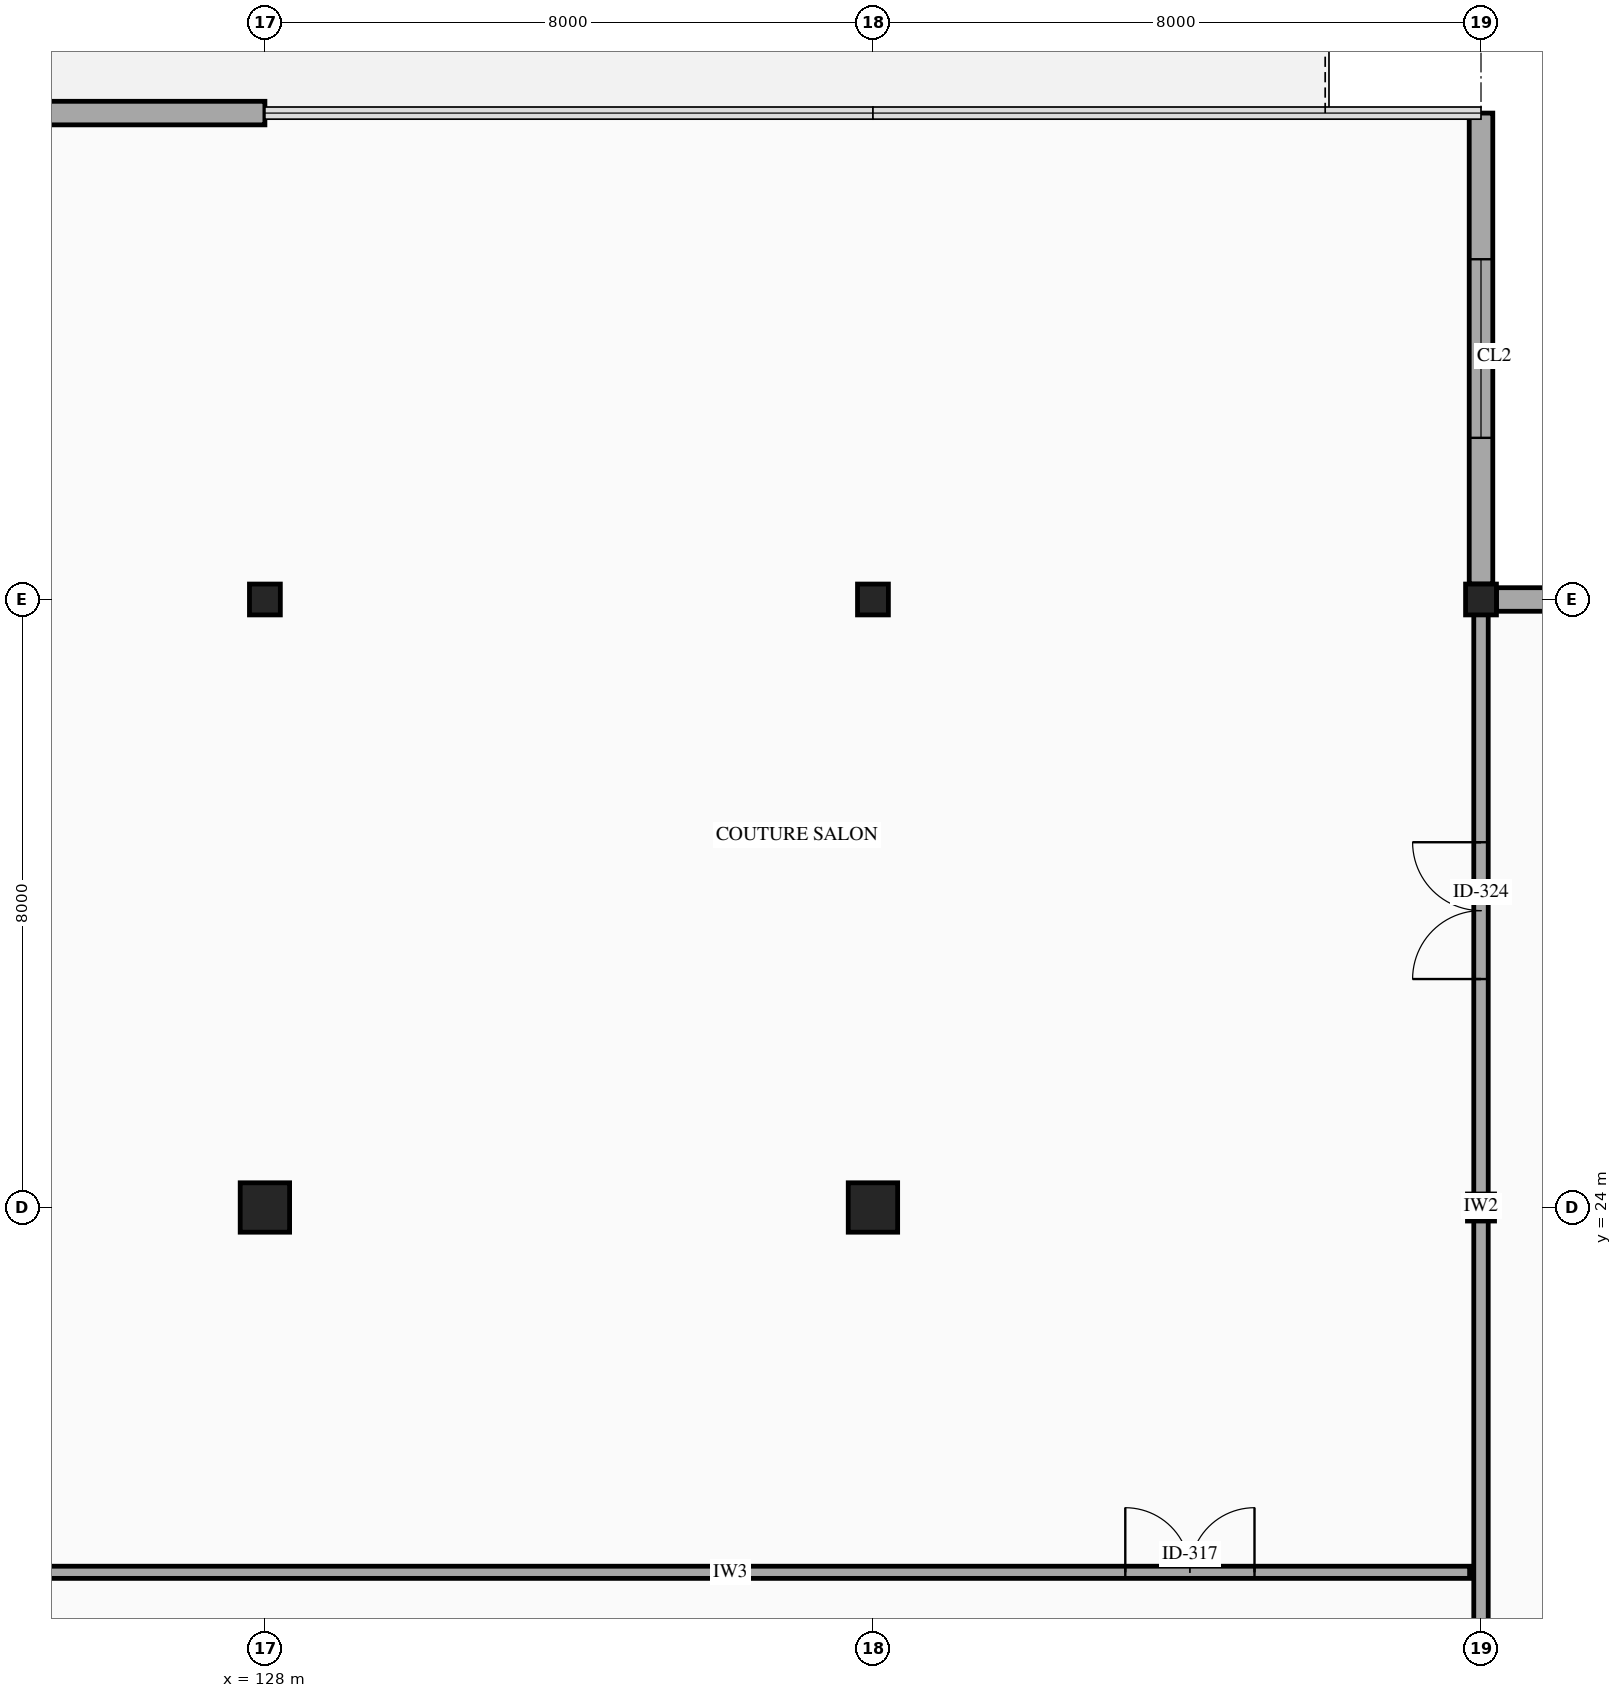
"""IFC4 building model, lengths in metres.
Left out: names, types, materials, properties, quantities, classifications, styles, units other than length and angle.
Written with IfcOpenShell. Run it as: python <this file> out.ifc"""

import sys

from ifc_helpers import new_model, si_unit, direction, frame, frame_2d, origin, origin_2d, place, context, subcontext, project, spatial, rectangle, hollow_rectangle, hollow_circle, extrude, element, fill, save


model = new_model("IFC4")
c1 = context("Model", 3, precision=1e-05, world=origin(), true_north=direction((0.0, 1.0)))
c2 = subcontext(c1, "Body", "Model", "MODEL_VIEW")
j1 = project(units=[si_unit("LENGTHUNIT", "METRE"), si_unit("PLANEANGLEUNIT", "RADIAN")], contexts=[c1])
p1 = place(None, origin())
s1 = spatial("IfcSite", under=j1, at=p1, CompositionType="ELEMENT")
p2 = place(p1, origin())
s2 = spatial("IfcBuilding", under=s1, at=p2, CompositionType="ELEMENT")
p3 = place(p2, frame((0.0, 0.0, 10.4)))
s3 = spatial("IfcBuildingStorey", under=s2, at=p3, CompositionType="ELEMENT", Elevation=10.4)
p4 = place(p3, frame((128.0, 24.0, 0.0), z_axis=(0.0, 0.0, 1.0), x_axis=(1.0, 0.0, 0.0)))
e1 = element("IfcColumn", 1, at=p4, inside=s3, PredefinedType="COLUMN", context=c2, shape_type="SweptSolid", body=[
    extrude(rectangle(XDim=0.65, YDim=0.65, at=origin_2d()), origin(), (0.0, 0.0, 1.0), 4.5),
])
p5 = place(p3, frame((128.0, 32.0, 0.0), z_axis=(0.0, 0.0, 1.0), x_axis=(1.0, 0.0, 0.0)))
e2 = element("IfcColumn", 2, at=p5, inside=s3, PredefinedType="COLUMN", context=c2, shape_type="SweptSolid", body=[
    extrude(hollow_circle(Radius=0.203, WallThickness=0.012, at=origin_2d()), origin(), (0.0, 0.0, 1.0), 4.5),
])
p6 = place(p3, frame((136.0, 24.0, 0.0), z_axis=(0.0, 0.0, 1.0), x_axis=(1.0, 0.0, 0.0)))
e3 = element("IfcColumn", 3, at=p6, inside=s3, PredefinedType="COLUMN", context=c2, shape_type="SweptSolid", body=[
    extrude(rectangle(XDim=0.65, YDim=0.65, at=origin_2d()), origin(), (0.0, 0.0, 1.0), 4.5),
])
p7 = place(p3, frame((136.0, 32.0, 0.0), z_axis=(0.0, 0.0, 1.0), x_axis=(1.0, 0.0, 0.0)))
e4 = element("IfcColumn", 4, at=p7, inside=s3, PredefinedType="COLUMN", context=c2, shape_type="SweptSolid", body=[
    extrude(hollow_circle(Radius=0.203, WallThickness=0.012, at=origin_2d()), origin(), (0.0, 0.0, 1.0), 4.5),
])
p8 = place(p3, frame((144.0, 24.0, 0.0), z_axis=(0.0, 0.0, 1.0), x_axis=(1.0, 0.0, 0.0)))
e5 = element("IfcColumn", 5, at=p8, inside=s3, PredefinedType="COLUMN", context=c2, shape_type="SweptSolid", body=[
    extrude(hollow_rectangle(XDim=0.356, YDim=0.356, WallThickness=0.012, InnerFilletRadius=0.012, OuterFilletRadius=0.024, at=origin_2d()), origin(), (0.0, 0.0, 1.0), 4.5),
])
p9 = place(p3, frame((144.0, 32.0, 0.0), z_axis=(0.0, 0.0, 1.0), x_axis=(1.0, 0.0, 0.0)))
e6 = element("IfcColumn", 6, at=p9, inside=s3, PredefinedType="COLUMN", context=c2, shape_type="SweptSolid", body=[
    extrude(hollow_circle(Radius=0.203, WallThickness=0.012, at=origin_2d()), origin(), (0.0, 0.0, 1.0), 4.5),
])
p10 = place(p3, frame((120.0, 38.4, 0.0), z_axis=(0.0, 0.0, 1.0), x_axis=(1.0, 0.0, 0.0)))
e7 = element("IfcWall", 7, at=p10, inside=s3, PredefinedType="STANDARD", context=c2, shape_type="SweptSolid", body=[
    extrude(rectangle(XDim=8.0, YDim=0.31, at=frame_2d((4.0, 0.0))), origin(), (0.0, 0.0, 1.0), 3.48),
])
p11 = place(p10, frame((3.225, 0.0, 0.0)))
e8 = element("IfcOpeningElement", 8, at=p11, cuts=e7, PredefinedType="OPENING", context=c2, shape_type="SweptSolid", body=[
    extrude(rectangle(XDim=1.55, YDim=2.15, at=frame_2d((0.775, 1.075))), frame((0.0, 0.165, 0.0), z_axis=(0.0, -1.0, 0.0), x_axis=(1.0, 0.0, 0.0)), (0.0, 0.0, 1.0), 0.33),
])
p12 = place(p3, frame((144.0, 38.4, 0.0), z_axis=(0.0, 0.0, 1.0), x_axis=(0.0, -1.0, 0.0)))
e9 = element("IfcWall", 9, at=p12, inside=s3, PredefinedType="STANDARD", context=c2, shape_type="SweptSolid", body=[
    extrude(rectangle(XDim=6.197, YDim=0.31, at=frame_2d((3.099, 0.0))), origin(), (0.0, 0.0, 1.0), 3.48),
])
p13 = place(p12, frame((1.923, 0.0, 0.8)))
e10 = element("IfcOpeningElement", 10, at=p13, cuts=e9, PredefinedType="OPENING", context=c2, shape_type="SweptSolid", body=[
    extrude(rectangle(XDim=2.35, YDim=2.15, at=frame_2d((1.175, 1.075))), frame((0.0, 0.165, 0.0), z_axis=(0.0, -1.0, 0.0), x_axis=(1.0, 0.0, 0.0)), (0.0, 0.0, 1.0), 0.33),
])
p14 = place(p3, frame((144.203, 32.0, 0.0), z_axis=(0.0, 0.0, 1.0), x_axis=(1.0, 0.0, 0.0)))
e11 = element("IfcWall", 11, at=p14, inside=s3, PredefinedType="STANDARD", context=c2, shape_type="SweptSolid", body=[
    extrude(rectangle(XDim=7.619, YDim=0.31, at=frame_2d((3.81, 0.0))), origin(), (0.0, 0.0, 1.0), 3.48),
])
p15 = place(p14, frame((2.635, 0.0, 0.8)))
e12 = element("IfcOpeningElement", 12, at=p15, cuts=e11, PredefinedType="OPENING", context=c2, shape_type="SweptSolid", body=[
    extrude(rectangle(XDim=2.35, YDim=2.15, at=frame_2d((1.175, 1.075))), frame((0.0, 0.165, 0.0), z_axis=(0.0, -1.0, 0.0), x_axis=(1.0, 0.0, 0.0)), (0.0, 0.0, 1.0), 0.33),
])
p16 = place(p3, frame((124.4, 19.2, 0.0), z_axis=(0.0, 0.0, 1.0), x_axis=(1.0, 0.0, 0.0)))
e13 = element("IfcWall", 13, at=p16, inside=s3, PredefinedType="PARTITIONING", context=c2, shape_type="SweptSolid", body=[
    extrude(rectangle(XDim=19.45, YDim=0.16, at=frame_2d((9.725, 0.0))), origin(), (0.0, 0.0, 1.0), 3.48),
])
p17 = place(p16, frame((14.92, 0.0, 0.0)))
e14 = element("IfcOpeningElement", 14, at=p17, cuts=e13, PredefinedType="OPENING", context=c2, shape_type="SweptSolid", body=[
    extrude(rectangle(XDim=1.7, YDim=2.25, at=frame_2d((0.85, 1.125))), frame((0.0, 0.09, 0.0), z_axis=(0.0, -1.0, 0.0), x_axis=(1.0, 0.0, 0.0)), (0.0, 0.0, 1.0), 0.18),
])
p18 = place(p3, frame((144.0, 16.178, 0.0), z_axis=(0.0, 0.0, 1.0), x_axis=(0.0, 1.0, 0.0)))
e15 = element("IfcWall", 15, at=p18, inside=s3, PredefinedType="PARTITIONING", context=c2, shape_type="SweptSolid", body=[
    extrude(rectangle(XDim=15.672, YDim=0.19, at=frame_2d((7.836, 0.0))), origin(), (0.0, 0.0, 1.0), 3.48),
])
p19 = place(p18, frame((10.828, 0.0, 0.0)))
e16 = element("IfcOpeningElement", 16, at=p19, cuts=e15, PredefinedType="OPENING", context=c2, shape_type="SweptSolid", body=[
    extrude(rectangle(XDim=1.8, YDim=2.25, at=frame_2d((0.9, 1.125))), frame((0.0, 0.105, 0.0), z_axis=(0.0, -1.0, 0.0), x_axis=(1.0, 0.0, 0.0)), (0.0, 0.0, 1.0), 0.21),
])
p20 = place(p13, origin())
e17 = element("IfcWindow", 17, at=p20, inside=s3, PartitioningType="DOUBLE_PANEL_VERTICAL", PredefinedType="WINDOW", context=c2, shape_type="SweptSolid", body=[
    extrude(rectangle(XDim=2.35, YDim=2.15, at=frame_2d((1.175, 1.075))), frame((0.0, 0.03, 0.0), z_axis=(0.0, -1.0, 0.0), x_axis=(1.0, 0.0, 0.0)), (0.0, 0.0, 1.0), 0.06),
])
fill(e10, e17)
p21 = place(p17, origin())
e18 = element("IfcDoor", 18, at=p21, inside=s3, OperationType="DOUBLE_DOOR_SINGLE_SWING", PredefinedType="DOOR", context=c2, shape_type="SweptSolid", body=[
    extrude(rectangle(XDim=1.7, YDim=2.25, at=frame_2d((0.85, 1.125))), frame((0.0, 0.025, 0.0), z_axis=(0.0, -1.0, 0.0), x_axis=(1.0, 0.0, 0.0)), (0.0, 0.0, 1.0), 0.05),
])
fill(e14, e18)
p22 = place(p19, origin())
e19 = element("IfcDoor", 19, at=p22, inside=s3, OperationType="DOUBLE_DOOR_SINGLE_SWING", PredefinedType="DOOR", context=c2, shape_type="SweptSolid", body=[
    extrude(rectangle(XDim=1.8, YDim=2.25, at=frame_2d((0.9, 1.125))), frame((0.0, 0.025, 0.0), z_axis=(0.0, -1.0, 0.0), x_axis=(1.0, 0.0, 0.0)), (0.0, 0.0, 1.0), 0.05),
])
fill(e16, e19)
save(model, sys.argv[1])
